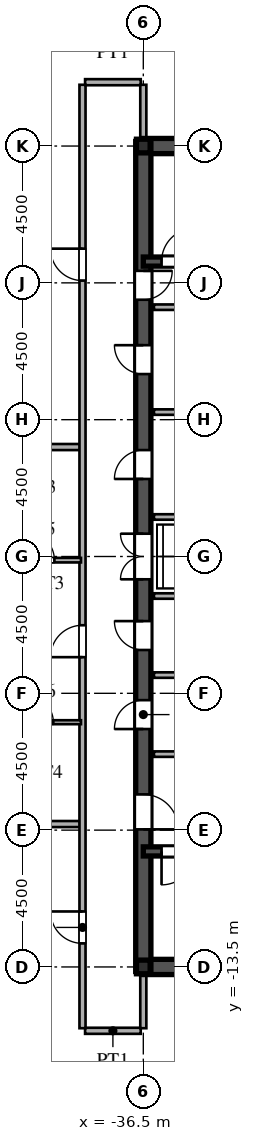
"""IFC4 building model, lengths in metres.
Left out: names, types, materials, properties, quantities, classifications, styles, units other than length and angle.
Written with IfcOpenShell. Run it as: python <this file> out.ifc"""

import sys

from ifc_helpers import new_model, si_unit, direction, frame, frame_2d, origin, origin_2d, place, context, subcontext, project, spatial, rectangle, i_section, extrude, source, transform, mapped, element, fill, save


model = new_model("IFC4")
c1 = context("Model", 3, precision=1e-05, world=origin(), true_north=direction((0.0, 1.0)))
c2 = subcontext(c1, "Body", "Model", "MODEL_VIEW")
j1 = project(units=[si_unit("LENGTHUNIT", "METRE"), si_unit("PLANEANGLEUNIT", "RADIAN")], contexts=[c1])
p1 = place(None, origin())
s1 = spatial("IfcSite", under=j1, at=p1, CompositionType="ELEMENT")
p2 = place(p1, origin())
s2 = spatial("IfcBuilding", under=s1, at=p2, CompositionType="ELEMENT")
p3 = place(p2, frame((0.0, 0.0, 239.4)))
s3 = spatial("IfcBuildingStorey", under=s2, at=p3, CompositionType="ELEMENT", Elevation=239.4)
m1 = source(origin(), c2, "Body", "SweptSolid", [
    extrude(i_section(OverallWidth=0.45, OverallDepth=0.45, WebThickness=0.016, FlangeThickness=0.025, at=origin_2d()), origin(), (0.0, 0.0, 1.0), 3.75),
])
for number, where, z_axis, x_axis in (
    (1, (-36.5, -13.5, 0.0), (0.0, 0.0, 1.0), (1.0, 0.0, 0.0)),
    (2, (-36.5, 13.5, 0.0), (0.0, 0.0, 1.0), (1.0, 0.0, 0.0)),
):
    element("IfcColumn", number, at=place(p3, frame(where, z_axis=z_axis, x_axis=x_axis)), inside=s3, PredefinedType="COLUMN", context=c2, shape_type="MappedRepresentation", body=[
        mapped(m1, transform((0.0, 0.0, 0.0), scale=1.0)),
    ])
for number, where, z_axis, x_axis in (
    (3, (-36.5, -13.5, 0.0), (0.0, 0.0, 1.0), (1.0, 0.0, 0.0)),
    (4, (-36.5, 13.5, 0.0), (0.0, 0.0, 1.0), (1.0, 0.0, 0.0)),
):
    element("IfcWall", number, at=place(p3, frame(where, z_axis=z_axis, x_axis=x_axis)), inside=s3, PredefinedType="SHEAR", context=c2, shape_type="SweptSolid", body=[
        extrude(rectangle(XDim=9.0, YDim=0.5, at=frame_2d((4.5, 0.0))), origin(), (0.0, 0.0, 1.0), 3.53),
    ])
p4 = place(p3, frame((-36.5, -13.65, 0.0), z_axis=(0.0, 0.0, 1.0), x_axis=(0.0, 1.0, 0.0)))
e5 = element("IfcWall", 5, at=p4, inside=s3, PredefinedType="SHEAR", context=c2, shape_type="SweptSolid", body=[
    extrude(rectangle(XDim=7.15, YDim=0.5, at=frame_2d((3.575, 0.0))), origin(), (0.0, 0.0, 1.0), 3.53),
])
p5 = place(p4, frame((4.675, 0.0, 0.0)))
e6 = element("IfcOpeningElement", 6, at=p5, cuts=e5, PredefinedType="OPENING", context=c2, shape_type="SweptSolid", body=[
    extrude(rectangle(XDim=1.15, YDim=2.2, at=frame_2d((0.575, 1.1))), frame((0.0, 0.26, 0.0), z_axis=(0.0, -1.0, 0.0), x_axis=(1.0, 0.0, 0.0)), (0.0, 0.0, 1.0), 0.52),
])
p6 = place(p3, frame((-36.5, -1.3, 0.0), z_axis=(0.0, 0.0, 1.0), x_axis=(0.0, 1.0, 0.0)))
e7 = element("IfcWall", 7, at=p6, inside=s3, PredefinedType="SHEAR", context=c2, shape_type="SweptSolid", body=[
    extrude(rectangle(XDim=2.6, YDim=0.5, at=frame_2d((1.3, 0.0))), origin(), (0.0, 0.0, 1.0), 3.53),
])
p7 = place(p6, frame((0.55, 0.0, 0.0)))
e8 = element("IfcOpeningElement", 8, at=p7, cuts=e7, PredefinedType="OPENING", context=c2, shape_type="SweptSolid", body=[
    extrude(rectangle(XDim=1.5, YDim=2.3, at=frame_2d((0.75, 1.15))), frame((0.0, 0.26, 0.0), z_axis=(0.0, -1.0, 0.0), x_axis=(1.0, 0.0, 0.0)), (0.0, 0.0, 1.0), 0.52),
])
p8 = place(p3, frame((-36.5, 8.2, 0.0), z_axis=(0.0, 0.0, 1.0), x_axis=(0.0, 1.0, 0.0)))
e9 = element("IfcWall", 9, at=p8, inside=s3, PredefinedType="SHEAR", context=c2, shape_type="SweptSolid", body=[
    extrude(rectangle(XDim=5.45, YDim=0.5, at=frame_2d((2.725, 0.0))), origin(), (0.0, 0.0, 1.0), 3.53),
])
p9 = place(p8, frame((0.245, 0.0, 0.0)))
e10 = element("IfcOpeningElement", 10, at=p9, cuts=e9, PredefinedType="OPENING", context=c2, shape_type="SweptSolid", body=[
    extrude(rectangle(XDim=0.95, YDim=2.15, at=frame_2d((0.475, 1.075))), frame((0.0, 0.26, 0.0), z_axis=(0.0, -1.0, 0.0), x_axis=(1.0, 0.0, 0.0)), (0.0, 0.0, 1.0), 0.52),
])
p10 = place(p3, frame((-36.5, -6.5, 0.0), z_axis=(0.0, 0.0, 1.0), x_axis=(0.0, 1.0, 0.0)))
e11 = element("IfcWall", 11, at=p10, inside=s3, PredefinedType="SHEAR", context=c2, shape_type="SweptSolid", body=[
    extrude(rectangle(XDim=2.6, YDim=0.5, at=frame_2d((1.3, 0.0))), origin(), (0.0, 0.0, 1.0), 3.53),
])
p11 = place(p10, frame((0.825, 0.0, 0.0)))
e12 = element("IfcOpeningElement", 12, at=p11, cuts=e11, PredefinedType="OPENING", context=c2, shape_type="SweptSolid", body=[
    extrude(rectangle(XDim=0.95, YDim=2.15, at=frame_2d((0.475, 1.075))), frame((0.0, 0.26, 0.0), z_axis=(0.0, -1.0, 0.0), x_axis=(1.0, 0.0, 0.0)), (0.0, 0.0, 1.0), 0.52),
])
p12 = place(p3, frame((-36.5, -3.9, 0.0), z_axis=(0.0, 0.0, 1.0), x_axis=(0.0, 1.0, 0.0)))
e13 = element("IfcWall", 13, at=p12, inside=s3, PredefinedType="SHEAR", context=c2, shape_type="SweptSolid", body=[
    extrude(rectangle(XDim=2.6, YDim=0.5, at=frame_2d((1.3, 0.0))), origin(), (0.0, 0.0, 1.0), 3.53),
])
p13 = place(p12, frame((0.825, 0.0, 0.0)))
e14 = element("IfcOpeningElement", 14, at=p13, cuts=e13, PredefinedType="OPENING", context=c2, shape_type="SweptSolid", body=[
    extrude(rectangle(XDim=0.95, YDim=2.15, at=frame_2d((0.475, 1.075))), frame((0.0, 0.26, 0.0), z_axis=(0.0, -1.0, 0.0), x_axis=(1.0, 0.0, 0.0)), (0.0, 0.0, 1.0), 0.52),
])
p14 = place(p3, frame((-36.5, 1.3, 0.0), z_axis=(0.0, 0.0, 1.0), x_axis=(0.0, 1.0, 0.0)))
e15 = element("IfcWall", 15, at=p14, inside=s3, PredefinedType="SHEAR", context=c2, shape_type="SweptSolid", body=[
    extrude(rectangle(XDim=3.45, YDim=0.5, at=frame_2d((1.725, 0.0))), origin(), (0.0, 0.0, 1.0), 3.53),
])
p15 = place(p14, frame((1.25, 0.0, 0.0)))
e16 = element("IfcOpeningElement", 16, at=p15, cuts=e15, PredefinedType="OPENING", context=c2, shape_type="SweptSolid", body=[
    extrude(rectangle(XDim=0.95, YDim=2.15, at=frame_2d((0.475, 1.075))), frame((0.0, 0.26, 0.0), z_axis=(0.0, -1.0, 0.0), x_axis=(1.0, 0.0, 0.0)), (0.0, 0.0, 1.0), 0.52),
])
p16 = place(p3, frame((-36.5, 4.75, 0.0), z_axis=(0.0, 0.0, 1.0), x_axis=(0.0, 1.0, 0.0)))
e17 = element("IfcWall", 17, at=p16, inside=s3, PredefinedType="SHEAR", context=c2, shape_type="SweptSolid", body=[
    extrude(rectangle(XDim=3.45, YDim=0.5, at=frame_2d((1.725, 0.0))), origin(), (0.0, 0.0, 1.0), 3.53),
])
p17 = place(p16, frame((1.25, 0.0, 0.0)))
e18 = element("IfcOpeningElement", 18, at=p17, cuts=e17, PredefinedType="OPENING", context=c2, shape_type="SweptSolid", body=[
    extrude(rectangle(XDim=0.95, YDim=2.15, at=frame_2d((0.475, 1.075))), frame((0.0, 0.26, 0.0), z_axis=(0.0, -1.0, 0.0), x_axis=(1.0, 0.0, 0.0)), (0.0, 0.0, 1.0), 0.52),
])
p18 = place(p3, frame((-36.5, -9.7, 0.0), z_axis=(0.0, 0.0, 1.0), x_axis=(1.0, 0.0, 0.0)))
e19 = element("IfcWall", 19, at=p18, inside=s3, PredefinedType="SHEAR", context=c2, shape_type="SweptSolid", body=[
    extrude(rectangle(XDim=9.0, YDim=0.3, at=frame_2d((4.5, 0.0))), origin(), (0.0, 0.0, 1.0), 3.53),
])
p19 = place(p18, frame((0.6, 0.0, 0.0)))
e20 = element("IfcOpeningElement", 20, at=p19, cuts=e19, PredefinedType="OPENING", context=c2, shape_type="SweptSolid", body=[
    extrude(rectangle(XDim=1.1, YDim=2.2, at=frame_2d((0.55, 1.1))), frame((0.0, 0.16, 0.0), z_axis=(0.0, -1.0, 0.0), x_axis=(1.0, 0.0, 0.0)), (0.0, 0.0, 1.0), 0.32),
])
p20 = place(p3, frame((-36.5, 9.7, 0.0), z_axis=(0.0, 0.0, 1.0), x_axis=(1.0, 0.0, 0.0)))
e21 = element("IfcWall", 21, at=p20, inside=s3, PredefinedType="SHEAR", context=c2, shape_type="SweptSolid", body=[
    extrude(rectangle(XDim=9.0, YDim=0.3, at=frame_2d((4.5, 0.0))), origin(), (0.0, 0.0, 1.0), 3.53),
])
p21 = place(p20, frame((0.6, 0.0, 0.0)))
e22 = element("IfcOpeningElement", 22, at=p21, cuts=e21, PredefinedType="OPENING", context=c2, shape_type="SweptSolid", body=[
    extrude(rectangle(XDim=1.1, YDim=2.2, at=frame_2d((0.55, 1.1))), frame((0.0, 0.16, 0.0), z_axis=(0.0, -1.0, 0.0), x_axis=(1.0, 0.0, 0.0)), (0.0, 0.0, 1.0), 0.32),
])
for number, where, z_axis, x_axis in (
    (23, (-36.15, -6.5, 0.0), (0.0, 0.0, 1.0), (1.0, 0.0, 0.0)),
    (24, (-36.15, 8.2, 0.0), (0.0, 0.0, 1.0), (1.0, 0.0, 0.0)),
):
    element("IfcWall", number, at=place(p3, frame(where, z_axis=z_axis, x_axis=x_axis)), inside=s3, PredefinedType="PARTITIONING", context=c2, shape_type="SweptSolid", body=[
        extrude(rectangle(XDim=5.7, YDim=0.18, at=frame_2d((2.85, 0.0))), origin(), (0.0, 0.0, 1.0), 3.53),
    ])
for number, where, z_axis, x_axis in (
    (25, (-36.15, -1.3, 0.0), (0.0, 0.0, 1.0), (1.0, 0.0, 0.0)),
    (26, (-36.15, 1.3, 0.0), (0.0, 0.0, 1.0), (1.0, 0.0, 0.0)),
    (27, (-36.15, -3.9, 0.0), (0.0, 0.0, 1.0), (1.0, 0.0, 0.0)),
    (28, (-36.15, 4.75, 0.0), (0.0, 0.0, 1.0), (1.0, 0.0, 0.0)),
):
    element("IfcWall", number, at=place(p3, frame(where, z_axis=z_axis, x_axis=x_axis)), inside=s3, PredefinedType="PARTITIONING", context=c2, shape_type="SweptSolid", body=[
        extrude(rectangle(XDim=2.95, YDim=0.18, at=frame_2d((1.475, 0.0))), origin(), (0.0, 0.0, 1.0), 3.53),
    ])
p22 = place(p3, frame((-38.415, -15.6, 0.0), z_axis=(0.0, 0.0, 1.0), x_axis=(1.0, 0.0, 0.0)))
e29 = element("IfcWall", 29, at=p22, inside=s3, PredefinedType="PARTITIONING", context=c2, shape_type="SweptSolid", body=[
    extrude(rectangle(XDim=1.83, YDim=0.2, at=frame_2d((0.915, 0.0))), origin(), (0.0, 0.0, 1.0), 3.53),
])
p23 = place(p3, frame((-55.343, -8.8, 0.0), z_axis=(0.0, 0.0, 1.0), x_axis=(1.0, 0.0, 0.0)))
e30 = element("IfcWall", 30, at=p23, inside=s3, PredefinedType="PARTITIONING", context=c2, shape_type="SweptSolid", body=[
    extrude(rectangle(XDim=16.763, YDim=0.2, at=frame_2d((8.381, 0.0))), origin(), (0.0, 0.0, 1.0), 3.53),
])
p24 = place(p3, frame((-41.25, -5.45, 0.0), z_axis=(0.0, 0.0, 1.0), x_axis=(1.0, 0.0, 0.0)))
e31 = element("IfcWall", 31, at=p24, inside=s3, PredefinedType="PARTITIONING", context=c2, shape_type="SweptSolid", body=[
    extrude(rectangle(XDim=2.7, YDim=0.13, at=frame_2d((1.35, 0.0))), origin(), (0.0, 0.0, 1.0), 3.53),
])
p25 = place(p24, frame((0.91, 0.0, 0.0)))
e32 = element("IfcOpeningElement", 32, at=p25, cuts=e31, PredefinedType="OPENING", context=c2, shape_type="SweptSolid", body=[
    extrude(rectangle(XDim=0.88, YDim=2.1, at=frame_2d((0.44, 1.05))), frame((0.0, 0.075, 0.0), z_axis=(0.0, -1.0, 0.0), x_axis=(1.0, 0.0, 0.0)), (0.0, 0.0, 1.0), 0.15),
])
p26 = place(p3, frame((-41.25, -0.12, 0.0), z_axis=(0.0, 0.0, 1.0), x_axis=(1.0, 0.0, 0.0)))
e33 = element("IfcWall", 33, at=p26, inside=s3, PredefinedType="PARTITIONING", context=c2, shape_type="SweptSolid", body=[
    extrude(rectangle(XDim=2.7, YDim=0.15, at=frame_2d((1.35, 0.0))), origin(), (0.0, 0.0, 1.0), 3.53),
])
p27 = place(p26, frame((0.875, 0.0, 0.0)))
e34 = element("IfcOpeningElement", 34, at=p27, cuts=e33, PredefinedType="OPENING", context=c2, shape_type="SweptSolid", body=[
    extrude(rectangle(XDim=0.95, YDim=2.15, at=frame_2d((0.475, 1.075))), frame((0.0, 0.085, 0.0), z_axis=(0.0, -1.0, 0.0), x_axis=(1.0, 0.0, 0.0)), (0.0, 0.0, 1.0), 0.17),
])
p28 = place(p3, frame((-64.01, 3.6, 0.0), z_axis=(0.0, 0.0, 1.0), x_axis=(1.0, 0.0, 0.0)))
e35 = element("IfcWall", 35, at=p28, inside=s3, PredefinedType="PARTITIONING", context=c2, shape_type="SweptSolid", body=[
    extrude(rectangle(XDim=25.43, YDim=0.2, at=frame_2d((12.715, 0.0))), origin(), (0.0, 0.0, 1.0), 3.53),
])
p29 = place(p3, frame((-38.415, 15.6, 0.0), z_axis=(0.0, 0.0, 1.0), x_axis=(1.0, 0.0, 0.0)))
e36 = element("IfcWall", 36, at=p29, inside=s3, PredefinedType="PARTITIONING", context=c2, shape_type="SweptSolid", body=[
    extrude(rectangle(XDim=1.83, YDim=0.2, at=frame_2d((0.915, 0.0))), origin(), (0.0, 0.0, 1.0), 3.53),
])
p30 = place(p3, frame((-38.5, -15.515, 0.0), z_axis=(0.0, 0.0, 1.0), x_axis=(0.0, 1.0, 0.0)))
e37 = element("IfcWall", 37, at=p30, inside=s3, PredefinedType="PARTITIONING", context=c2, shape_type="SweptSolid", body=[
    extrude(rectangle(XDim=31.03, YDim=0.2, at=frame_2d((15.515, 0.0))), origin(), (0.0, 0.0, 1.0), 3.53),
])
p31 = place(p30, frame((2.79, 0.0, 0.0)))
e38 = element("IfcOpeningElement", 38, at=p31, cuts=e37, PredefinedType="OPENING", context=c2, shape_type="SweptSolid", body=[
    extrude(rectangle(XDim=1.05, YDim=2.25, at=frame_2d((0.525, 1.125))), frame((0.0, 0.11, 0.0), z_axis=(0.0, -1.0, 0.0), x_axis=(1.0, 0.0, 0.0)), (0.0, 0.0, 1.0), 0.22),
])
p32 = place(p30, frame((12.204, 0.0, 0.0)))
e39 = element("IfcOpeningElement", 39, at=p32, cuts=e37, PredefinedType="OPENING", context=c2, shape_type="SweptSolid", body=[
    extrude(rectangle(XDim=1.05, YDim=2.25, at=frame_2d((0.525, 1.125))), frame((0.0, 0.11, 0.0), z_axis=(0.0, -1.0, 0.0), x_axis=(1.0, 0.0, 0.0)), (0.0, 0.0, 1.0), 0.22),
])
p33 = place(p30, frame((24.59, 0.0, 0.0)))
e40 = element("IfcOpeningElement", 40, at=p33, cuts=e37, PredefinedType="OPENING", context=c2, shape_type="SweptSolid", body=[
    extrude(rectangle(XDim=1.05, YDim=2.25, at=frame_2d((0.525, 1.125))), frame((0.0, 0.11, 0.0), z_axis=(0.0, -1.0, 0.0), x_axis=(1.0, 0.0, 0.0)), (0.0, 0.0, 1.0), 0.22),
])
for number, where, z_axis, x_axis in (
    (41, (-36.5, -15.515, 0.0), (0.0, 0.0, 1.0), (0.0, 1.0, 0.0)),
    (42, (-36.5, 13.755, 0.0), (0.0, 0.0, 1.0), (0.0, 1.0, 0.0)),
):
    element("IfcWall", number, at=place(p3, frame(where, z_axis=z_axis, x_axis=x_axis)), inside=s3, PredefinedType="PARTITIONING", context=c2, shape_type="SweptSolid", body=[
        extrude(rectangle(XDim=1.76, YDim=0.2, at=frame_2d((0.88, 0.0))), origin(), (0.0, 0.0, 1.0), 2.93),
    ])
m2 = source(origin(), c2, "Body", "SweptSolid", [
    extrude(rectangle(XDim=1.15, YDim=2.2, at=frame_2d((0.575, 1.1))), frame((0.0, 0.025, 0.0), z_axis=(0.0, -1.0, 0.0), x_axis=(1.0, 0.0, 0.0)), (0.0, 0.0, 1.0), 0.05),
])
p34 = place(p5, frame((1.15, 0.0, 0.0), z_axis=(0.0, 0.0, 1.0), x_axis=(-1.0, 0.0, 0.0)))
e43 = element("IfcDoor", 43, at=p34, inside=s3, OperationType="SINGLE_SWING_LEFT", PredefinedType="DOOR", context=c2, shape_type="MappedRepresentation", body=[
    mapped(m2, transform((0.0, 0.0, 0.0), scale=1.0)),
])
fill(e6, e43)
m3 = source(origin(), c2, "Body", "SweptSolid", [
    extrude(rectangle(XDim=1.5, YDim=2.3, at=frame_2d((0.75, 1.15))), frame((0.0, 0.025, 0.0), z_axis=(0.0, -1.0, 0.0), x_axis=(1.0, 0.0, 0.0)), (0.0, 0.0, 1.0), 0.05),
])
p35 = place(p7, origin())
e44 = element("IfcDoor", 44, at=p35, inside=s3, OperationType="DOUBLE_SWING_LEFT", PredefinedType="DOOR", context=c2, shape_type="MappedRepresentation", body=[
    mapped(m3, transform((0.0, 0.0, 0.0), scale=1.0)),
])
fill(e8, e44)
m4 = source(origin(), c2, "Body", "SweptSolid", [
    extrude(rectangle(XDim=0.95, YDim=2.15, at=frame_2d((0.475, 1.075))), frame((0.0, 0.025, 0.0), z_axis=(0.0, -1.0, 0.0), x_axis=(1.0, 0.0, 0.0)), (0.0, 0.0, 1.0), 0.05),
])
p36 = place(p9, frame((0.95, 0.0, 0.0), z_axis=(0.0, 0.0, 1.0), x_axis=(-1.0, 0.0, 0.0)))
e45 = element("IfcDoor", 45, at=p36, inside=s3, OperationType="SINGLE_SWING_RIGHT", PredefinedType="DOOR", context=c2, shape_type="MappedRepresentation", body=[
    mapped(m4, transform((0.0, 0.0, 0.0), scale=1.0)),
])
fill(e10, e45)
p37 = place(p11, origin())
e46 = element("IfcDoor", 46, at=p37, inside=s3, OperationType="SINGLE_SWING_LEFT", PredefinedType="DOOR", context=c2, shape_type="MappedRepresentation", body=[
    mapped(m4, transform((0.0, 0.0, 0.0), scale=1.0)),
])
fill(e12, e46)
p38 = place(p13, origin())
e47 = element("IfcDoor", 47, at=p38, inside=s3, OperationType="SINGLE_SWING_RIGHT", PredefinedType="DOOR", context=c2, shape_type="MappedRepresentation", body=[
    mapped(m4, transform((0.0, 0.0, 0.0), scale=1.0)),
])
fill(e14, e47)
p39 = place(p15, origin())
e48 = element("IfcDoor", 48, at=p39, inside=s3, OperationType="SINGLE_SWING_LEFT", PredefinedType="DOOR", context=c2, shape_type="MappedRepresentation", body=[
    mapped(m4, transform((0.0, 0.0, 0.0), scale=1.0)),
])
fill(e16, e48)
p40 = place(p17, origin())
e49 = element("IfcDoor", 49, at=p40, inside=s3, OperationType="SINGLE_SWING_RIGHT", PredefinedType="DOOR", context=c2, shape_type="MappedRepresentation", body=[
    mapped(m4, transform((0.0, 0.0, 0.0), scale=1.0)),
])
fill(e18, e49)
m5 = source(origin(), c2, "Body", "SweptSolid", [
    extrude(rectangle(XDim=1.1, YDim=2.2, at=frame_2d((0.55, 1.1))), frame((0.0, 0.025, 0.0), z_axis=(0.0, -1.0, 0.0), x_axis=(1.0, 0.0, 0.0)), (0.0, 0.0, 1.0), 0.05),
])
p41 = place(p19, frame((1.1, 0.0, 0.0), z_axis=(0.0, 0.0, 1.0), x_axis=(-1.0, 0.0, 0.0)))
e50 = element("IfcDoor", 50, at=p41, inside=s3, OperationType="SINGLE_SWING_LEFT", PredefinedType="DOOR", context=c2, shape_type="MappedRepresentation", body=[
    mapped(m5, transform((0.0, 0.0, 0.0), scale=1.0)),
])
fill(e20, e50)
p42 = place(p21, origin())
e51 = element("IfcDoor", 51, at=p42, inside=s3, OperationType="SINGLE_SWING_RIGHT", PredefinedType="DOOR", context=c2, shape_type="MappedRepresentation", body=[
    mapped(m5, transform((0.0, 0.0, 0.0), scale=1.0)),
])
fill(e22, e51)
m6 = source(origin(), c2, "Body", "SweptSolid", [
    extrude(rectangle(XDim=0.88, YDim=2.1, at=frame_2d((0.44, 1.05))), frame((0.0, 0.025, 0.0), z_axis=(0.0, -1.0, 0.0), x_axis=(1.0, 0.0, 0.0)), (0.0, 0.0, 1.0), 0.05),
])
p43 = place(p25, origin())
e52 = element("IfcDoor", 52, at=p43, inside=s3, OperationType="SINGLE_SWING_LEFT", PredefinedType="DOOR", context=c2, shape_type="MappedRepresentation", body=[
    mapped(m6, transform((0.0, 0.0, 0.0), scale=1.0)),
])
fill(e32, e52)
m7 = source(origin(), c2, "Body", "SweptSolid", [
    extrude(rectangle(XDim=0.95, YDim=2.15, at=frame_2d((0.475, 1.075))), frame((0.0, 0.025, 0.0), z_axis=(0.0, -1.0, 0.0), x_axis=(1.0, 0.0, 0.0)), (0.0, 0.0, 1.0), 0.05),
])
p44 = place(p27, origin())
e53 = element("IfcDoor", 53, at=p44, inside=s3, OperationType="SINGLE_SWING_LEFT", PredefinedType="DOOR", context=c2, shape_type="MappedRepresentation", body=[
    mapped(m7, transform((0.0, 0.0, 0.0), scale=1.0)),
])
fill(e34, e53)
m8 = source(origin(), c2, "Body", "SweptSolid", [
    extrude(rectangle(XDim=1.05, YDim=2.25, at=frame_2d((0.525, 1.125))), frame((0.0, 0.025, 0.0), z_axis=(0.0, -1.0, 0.0), x_axis=(1.0, 0.0, 0.0)), (0.0, 0.0, 1.0), 0.05),
])
p45 = place(p31, origin())
e54 = element("IfcDoor", 54, at=p45, inside=s3, OperationType="SINGLE_SWING_RIGHT", PredefinedType="DOOR", context=c2, shape_type="MappedRepresentation", body=[
    mapped(m8, transform((0.0, 0.0, 0.0), scale=1.0)),
])
fill(e38, e54)
p46 = place(p32, origin())
e55 = element("IfcDoor", 55, at=p46, inside=s3, OperationType="SINGLE_SWING_LEFT", PredefinedType="DOOR", context=c2, shape_type="MappedRepresentation", body=[
    mapped(m8, transform((0.0, 0.0, 0.0), scale=1.0)),
])
fill(e39, e55)
p47 = place(p33, origin())
e56 = element("IfcDoor", 56, at=p47, inside=s3, OperationType="SINGLE_SWING_RIGHT", PredefinedType="DOOR", context=c2, shape_type="MappedRepresentation", body=[
    mapped(m8, transform((0.0, 0.0, 0.0), scale=1.0)),
])
fill(e40, e56)
save(model, sys.argv[1])
